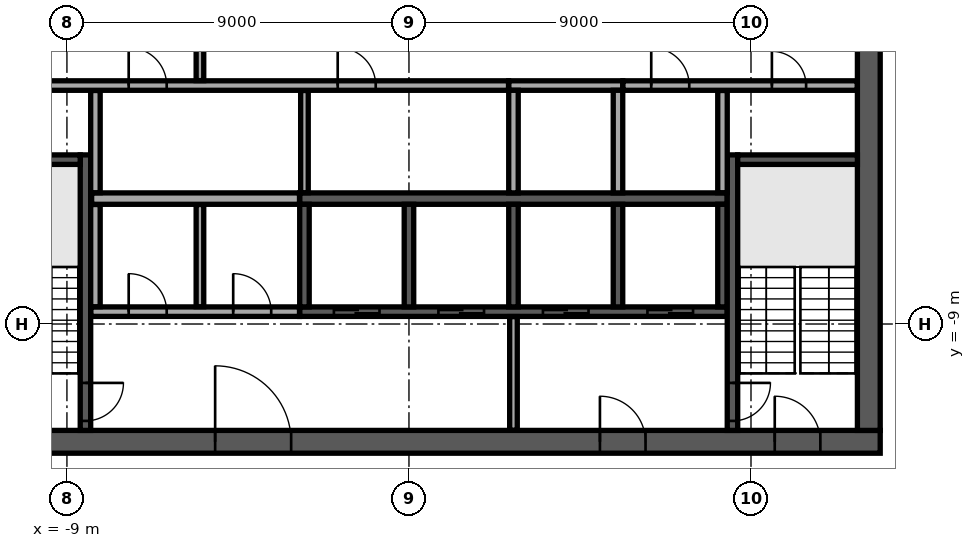
"""IFC4 building model, lengths in metres.
Left out: names, types, materials, properties, quantities, classifications, styles, units other than length and angle.
Written with IfcOpenShell. Run it as: python <this file> out.ifc"""

import sys

from ifc_helpers import new_model, si_unit, direction, frame, frame_2d, origin, place, context, subcontext, project, spatial, rectangle, extrude, element, fill, save


model = new_model("IFC4")
c1 = context("Model", 3, precision=1e-05, world=origin(), true_north=direction((0.0, 1.0)))
c2 = subcontext(c1, "Body", "Model", "MODEL_VIEW")
j1 = project(units=[si_unit("LENGTHUNIT", "METRE"), si_unit("PLANEANGLEUNIT", "RADIAN")], contexts=[c1])
p1 = place(None, origin())
s1 = spatial("IfcSite", under=j1, at=p1, CompositionType="ELEMENT")
p2 = place(p1, origin())
s2 = spatial("IfcBuilding", under=s1, at=p2, CompositionType="ELEMENT")
p3 = place(p2, frame((0.0, 0.0, 296.5)))
s3 = spatial("IfcBuildingStorey", under=s2, at=p3, CompositionType="ELEMENT", Elevation=296.5)
p4 = place(p3, frame((-12.4, -12.1, 0.0), z_axis=(0.0, 0.0, 1.0), x_axis=(1.0, 0.0, 0.0)))
e1 = element("IfcWall", 1, at=p4, inside=s3, PredefinedType="SHEAR", context=c2, shape_type="SweptSolid", body=[
    extrude(rectangle(XDim=24.8, YDim=0.6, at=frame_2d((12.4, 0.0))), origin(), (0.0, 0.0, 1.0), 3.65),
])
p5 = place(p4, frame((7.3, 0.0, 0.0)))
e2 = element("IfcOpeningElement", 2, at=p5, cuts=e1, PredefinedType="OPENING", context=c2, shape_type="SweptSolid", body=[
    extrude(rectangle(XDim=2.0, YDim=2.1, at=frame_2d((1.0, 1.05))), frame((0.0, 0.31, 0.0), z_axis=(0.0, -1.0, 0.0), x_axis=(1.0, 0.0, 0.0)), (0.0, 0.0, 1.0), 0.62),
])
p6 = place(p4, frame((17.425, 0.0, 0.0)))
e3 = element("IfcOpeningElement", 3, at=p6, cuts=e1, PredefinedType="OPENING", context=c2, shape_type="SweptSolid", body=[
    extrude(rectangle(XDim=1.2, YDim=2.1, at=frame_2d((0.6, 1.05))), frame((0.0, 0.31, 0.0), z_axis=(0.0, -1.0, 0.0), x_axis=(1.0, 0.0, 0.0)), (0.0, 0.0, 1.0), 0.62),
])
p7 = place(p4, frame((1.575, 0.0, 0.0)))
e4 = element("IfcOpeningElement", 4, at=p7, cuts=e1, PredefinedType="OPENING", context=c2, shape_type="SweptSolid", body=[
    extrude(rectangle(XDim=1.2, YDim=2.1, at=frame_2d((0.6, 1.05))), frame((0.0, 0.31, 0.0), z_axis=(0.0, -1.0, 0.0), x_axis=(1.0, 0.0, 0.0)), (0.0, 0.0, 1.0), 0.62),
])
p8 = place(p4, frame((22.025, 0.0, 0.0)))
e5 = element("IfcOpeningElement", 5, at=p8, cuts=e1, PredefinedType="OPENING", context=c2, shape_type="SweptSolid", body=[
    extrude(rectangle(XDim=1.2, YDim=2.1, at=frame_2d((0.6, 1.05))), frame((0.0, 0.31, 0.0), z_axis=(0.0, -1.0, 0.0), x_axis=(1.0, 0.0, 0.0)), (0.0, 0.0, 1.0), 0.62),
])
p9 = place(p3, frame((12.1, -11.8, 0.0), z_axis=(0.0, 0.0, 1.0), x_axis=(0.0, 1.0, 0.0)))
e6 = element("IfcWall", 6, at=p9, inside=s3, PredefinedType="SHEAR", context=c2, shape_type="SweptSolid", body=[
    extrude(rectangle(XDim=23.6, YDim=0.6, at=frame_2d((11.8, 0.0))), origin(), (0.0, 0.0, 1.0), 3.65),
])
p10 = place(p9, frame((10.6, 0.0, 0.0)))
e7 = element("IfcOpeningElement", 7, at=p10, cuts=e6, PredefinedType="OPENING", context=c2, shape_type="SweptSolid", body=[
    extrude(rectangle(XDim=2.4, YDim=2.4, at=frame_2d((1.2, 1.2))), frame((0.0, 0.31, 0.0), z_axis=(0.0, -1.0, 0.0), x_axis=(1.0, 0.0, 0.0)), (0.0, 0.0, 1.0), 0.62),
])
p11 = place(p3, frame((-2.875, -5.7, 0.0), z_axis=(0.0, 0.0, 1.0), x_axis=(1.0, 0.0, 0.0)))
e8 = element("IfcWall", 8, at=p11, inside=s3, PredefinedType="SOLIDWALL", context=c2, shape_type="SweptSolid", body=[
    extrude(rectangle(XDim=11.25, YDim=0.3, at=frame_2d((5.625, 0.0))), origin(), (0.0, 0.0, 1.0), 3.65),
])
p12 = place(p3, frame((2.625, -2.725, 0.0), z_axis=(0.0, 0.0, 1.0), x_axis=(1.0, 0.0, 0.0)))
e9 = element("IfcWall", 9, at=p12, inside=s3, PredefinedType="SOLIDWALL", context=c2, shape_type="SweptSolid", body=[
    extrude(rectangle(XDim=3.0, YDim=0.25, at=frame_2d((1.5, 0.0))), origin(), (0.0, 0.0, 1.0), 3.65),
])
for number, where, z_axis, x_axis in (
    (10, (2.75, -5.55, 0.0), (0.0, 0.0, 1.0), (0.0, 1.0, 0.0)),
    (11, (5.5, -5.55, 0.0), (0.0, 0.0, 1.0), (0.0, 1.0, 0.0)),
):
    element("IfcWall", number, at=place(p3, frame(where, z_axis=z_axis, x_axis=x_axis)), inside=s3, PredefinedType="SOLIDWALL", context=c2, shape_type="SweptSolid", body=[
        extrude(rectangle(XDim=2.7, YDim=0.25, at=frame_2d((1.35, 0.0))), origin(), (0.0, 0.0, 1.0), 3.65),
    ])
p13 = place(p3, frame((-2.875, -8.675, 0.0), z_axis=(0.0, 0.0, 1.0), x_axis=(1.0, 0.0, 0.0)))
e12 = element("IfcWall", 12, at=p13, inside=s3, PredefinedType="SOLIDWALL", context=c2, shape_type="SweptSolid", body=[
    extrude(rectangle(XDim=11.25, YDim=0.25, at=frame_2d((5.625, 0.0))), origin(), (0.0, 0.0, 1.0), 3.65),
])
p14 = place(p13, frame((0.9, 0.0, 0.0)))
e13 = element("IfcOpeningElement", 13, at=p14, cuts=e12, PredefinedType="OPENING", context=c2, shape_type="SweptSolid", body=[
    extrude(rectangle(XDim=1.2, YDim=2.1, at=frame_2d((0.6, 1.05))), frame((0.0, 0.135, 0.0), z_axis=(0.0, -1.0, 0.0), x_axis=(1.0, 0.0, 0.0)), (0.0, 0.0, 1.0), 0.27),
])
p15 = place(p13, frame((3.65, 0.0, 0.0)))
e14 = element("IfcOpeningElement", 14, at=p15, cuts=e12, PredefinedType="OPENING", context=c2, shape_type="SweptSolid", body=[
    extrude(rectangle(XDim=1.2, YDim=2.1, at=frame_2d((0.6, 1.05))), frame((0.0, 0.135, 0.0), z_axis=(0.0, -1.0, 0.0), x_axis=(1.0, 0.0, 0.0)), (0.0, 0.0, 1.0), 0.27),
])
p16 = place(p13, frame((6.4, 0.0, 0.0)))
e15 = element("IfcOpeningElement", 15, at=p16, cuts=e12, PredefinedType="OPENING", context=c2, shape_type="SweptSolid", body=[
    extrude(rectangle(XDim=1.2, YDim=2.1, at=frame_2d((0.6, 1.05))), frame((0.0, 0.135, 0.0), z_axis=(0.0, -1.0, 0.0), x_axis=(1.0, 0.0, 0.0)), (0.0, 0.0, 1.0), 0.27),
])
p17 = place(p13, frame((9.15, 0.0, 0.0)))
e16 = element("IfcOpeningElement", 16, at=p17, cuts=e12, PredefinedType="OPENING", context=c2, shape_type="SweptSolid", body=[
    extrude(rectangle(XDim=1.2, YDim=2.1, at=frame_2d((0.6, 1.05))), frame((0.0, 0.135, 0.0), z_axis=(0.0, -1.0, 0.0), x_axis=(1.0, 0.0, 0.0)), (0.0, 0.0, 1.0), 0.27),
])
for number, where, z_axis, x_axis in (
    (17, (-2.75, -8.55, 0.0), (0.0, 0.0, 1.0), (0.0, 1.0, 0.0)),
    (18, (0.0, -8.55, 0.0), (0.0, 0.0, 1.0), (0.0, 1.0, 0.0)),
    (19, (2.75, -8.55, 0.0), (0.0, 0.0, 1.0), (0.0, 1.0, 0.0)),
    (20, (5.5, -8.55, 0.0), (0.0, 0.0, 1.0), (0.0, 1.0, 0.0)),
    (21, (8.25, -8.55, 0.0), (0.0, 0.0, 1.0), (0.0, 1.0, 0.0)),
):
    element("IfcWall", number, at=place(p3, frame(where, z_axis=z_axis, x_axis=x_axis)), inside=s3, PredefinedType="SOLIDWALL", context=c2, shape_type="SweptSolid", body=[
        extrude(rectangle(XDim=2.7, YDim=0.25, at=frame_2d((1.35, 0.0))), origin(), (0.0, 0.0, 1.0), 3.65),
    ])
p18 = place(p3, frame((-8.512, -4.55, 0.0), z_axis=(0.0, 0.0, 1.0), x_axis=(0.0, -1.0, 0.0)))
e22 = element("IfcWall", 22, at=p18, inside=s3, PredefinedType="SOLIDWALL", context=c2, shape_type="SweptSolid", body=[
    extrude(rectangle(XDim=7.25, YDim=0.275, at=frame_2d((3.625, 0.0))), origin(), (0.0, 0.0, 1.0), 3.65),
])
p19 = place(p18, frame((6.0, 0.0, 0.0)))
e23 = element("IfcOpeningElement", 23, at=p19, cuts=e22, PredefinedType="OPENING", context=c2, shape_type="SweptSolid", body=[
    extrude(rectangle(XDim=1.0, YDim=2.1, at=frame_2d((0.5, 1.05))), frame((0.0, 0.147, 0.0), z_axis=(0.0, -1.0, 0.0), x_axis=(1.0, 0.0, 0.0)), (0.0, 0.0, 1.0), 0.295),
])
p20 = place(p3, frame((-8.65, -4.675, 0.0), z_axis=(0.0, 0.0, 1.0), x_axis=(-1.0, 0.0, 0.0)))
e24 = element("IfcWall", 24, at=p20, inside=s3, PredefinedType="SOLIDWALL", context=c2, shape_type="SweptSolid", body=[
    extrude(rectangle(XDim=3.15, YDim=0.25, at=frame_2d((1.575, 0.0))), origin(), (0.0, 0.0, 1.0), 3.65),
])
p21 = place(p3, frame((8.512, -4.55, 0.0), z_axis=(0.0, 0.0, 1.0), x_axis=(0.0, -1.0, 0.0)))
e25 = element("IfcWall", 25, at=p21, inside=s3, PredefinedType="SOLIDWALL", context=c2, shape_type="SweptSolid", body=[
    extrude(rectangle(XDim=7.25, YDim=0.275, at=frame_2d((3.625, 0.0))), origin(), (0.0, 0.0, 1.0), 3.65),
])
p22 = place(p21, frame((6.0, 0.0, 0.0)))
e26 = element("IfcOpeningElement", 26, at=p22, cuts=e25, PredefinedType="OPENING", context=c2, shape_type="SweptSolid", body=[
    extrude(rectangle(XDim=1.0, YDim=2.1, at=frame_2d((0.5, 1.05))), frame((0.0, 0.147, 0.0), z_axis=(0.0, -1.0, 0.0), x_axis=(1.0, 0.0, 0.0)), (0.0, 0.0, 1.0), 0.295),
])
p23 = place(p3, frame((8.65, -4.675, 0.0), z_axis=(0.0, 0.0, 1.0), x_axis=(1.0, 0.0, 0.0)))
e27 = element("IfcWall", 27, at=p23, inside=s3, PredefinedType="SOLIDWALL", context=c2, shape_type="SweptSolid", body=[
    extrude(rectangle(XDim=3.15, YDim=0.25, at=frame_2d((1.575, 0.0))), origin(), (0.0, 0.0, 1.0), 3.65),
])
p24 = place(p3, frame((2.75, -11.795, 0.0), z_axis=(0.0, 0.0, 1.0), x_axis=(0.0, 1.0, 0.0)))
e28 = element("IfcWall", 28, at=p24, inside=s3, PredefinedType="PARTITIONING", context=c2, shape_type="SweptSolid", body=[
    extrude(rectangle(XDim=2.99, YDim=0.2, at=frame_2d((1.495, 0.0))), origin(), (0.0, 0.0, 1.0), 3.65),
])
p25 = place(p3, frame((-8.37, -8.675, 0.0), z_axis=(0.0, 0.0, 1.0), x_axis=(1.0, 0.0, 0.0)))
e29 = element("IfcWall", 29, at=p25, inside=s3, PredefinedType="PARTITIONING", context=c2, shape_type="SweptSolid", body=[
    extrude(rectangle(XDim=5.49, YDim=0.25, at=frame_2d((2.745, 0.0))), origin(), (0.0, 0.0, 1.0), 3.65),
])
p26 = place(p25, frame((0.995, 0.0, 0.0)))
e30 = element("IfcOpeningElement", 30, at=p26, cuts=e29, PredefinedType="OPENING", context=c2, shape_type="SweptSolid", body=[
    extrude(rectangle(XDim=1.0, YDim=2.1, at=frame_2d((0.5, 1.05))), frame((0.0, 0.135, 0.0), z_axis=(0.0, -1.0, 0.0), x_axis=(1.0, 0.0, 0.0)), (0.0, 0.0, 1.0), 0.27),
])
p27 = place(p25, frame((3.745, 0.0, 0.0)))
e31 = element("IfcOpeningElement", 31, at=p27, cuts=e29, PredefinedType="OPENING", context=c2, shape_type="SweptSolid", body=[
    extrude(rectangle(XDim=1.0, YDim=2.1, at=frame_2d((0.5, 1.05))), frame((0.0, 0.135, 0.0), z_axis=(0.0, -1.0, 0.0), x_axis=(1.0, 0.0, 0.0)), (0.0, 0.0, 1.0), 0.27),
])
p28 = place(p3, frame((-8.25, -8.545, 0.0), z_axis=(0.0, 0.0, 1.0), x_axis=(0.0, 1.0, 0.0)))
e32 = element("IfcWall", 32, at=p28, inside=s3, PredefinedType="PARTITIONING", context=c2, shape_type="SweptSolid", body=[
    extrude(rectangle(XDim=2.69, YDim=0.25, at=frame_2d((1.345, 0.0))), origin(), (0.0, 0.0, 1.0), 3.65),
])
p29 = place(p3, frame((-5.5, -8.545, 0.0), z_axis=(0.0, 0.0, 1.0), x_axis=(0.0, 1.0, 0.0)))
e33 = element("IfcWall", 33, at=p29, inside=s3, PredefinedType="PARTITIONING", context=c2, shape_type="SweptSolid", body=[
    extrude(rectangle(XDim=2.69, YDim=0.2, at=frame_2d((1.345, 0.0))), origin(), (0.0, 0.0, 1.0), 3.65),
])
p30 = place(p3, frame((-8.35, -5.7, 0.0), z_axis=(0.0, 0.0, 1.0), x_axis=(1.0, 0.0, 0.0)))
e34 = element("IfcWall", 34, at=p30, inside=s3, PredefinedType="PARTITIONING", context=c2, shape_type="SweptSolid", body=[
    extrude(rectangle(XDim=5.47, YDim=0.3, at=frame_2d((2.735, 0.0))), origin(), (0.0, 0.0, 1.0), 3.65),
])
p31 = place(p3, frame((-8.25, -5.545, 0.0), z_axis=(0.0, 0.0, 1.0), x_axis=(0.0, 1.0, 0.0)))
e35 = element("IfcWall", 35, at=p31, inside=s3, PredefinedType="PARTITIONING", context=c2, shape_type="SweptSolid", body=[
    extrude(rectangle(XDim=2.69, YDim=0.25, at=frame_2d((1.345, 0.0))), origin(), (0.0, 0.0, 1.0), 3.65),
])
p32 = place(p3, frame((-2.75, -5.545, 0.0), z_axis=(0.0, 0.0, 1.0), x_axis=(0.0, 1.0, 0.0)))
e36 = element("IfcWall", 36, at=p32, inside=s3, PredefinedType="PARTITIONING", context=c2, shape_type="SweptSolid", body=[
    extrude(rectangle(XDim=2.69, YDim=0.2, at=frame_2d((1.345, 0.0))), origin(), (0.0, 0.0, 1.0), 3.65),
])
p33 = place(p3, frame((8.25, -5.545, 0.0), z_axis=(0.0, 0.0, 1.0), x_axis=(0.0, 1.0, 0.0)))
e37 = element("IfcWall", 37, at=p33, inside=s3, PredefinedType="PARTITIONING", context=c2, shape_type="SweptSolid", body=[
    extrude(rectangle(XDim=2.69, YDim=0.25, at=frame_2d((1.345, 0.0))), origin(), (0.0, 0.0, 1.0), 3.65),
])
p34 = place(p3, frame((-11.795, -2.725, 0.0), z_axis=(0.0, 0.0, 1.0), x_axis=(1.0, 0.0, 0.0)))
e38 = element("IfcWall", 38, at=p34, inside=s3, PredefinedType="PARTITIONING", context=c2, shape_type="SweptSolid", body=[
    extrude(rectangle(XDim=14.415, YDim=0.25, at=frame_2d((7.208, 0.0))), origin(), (0.0, 0.0, 1.0), 3.65),
])
p35 = place(p34, frame((1.295, 0.0, 0.0)))
e39 = element("IfcOpeningElement", 39, at=p35, cuts=e38, PredefinedType="OPENING", context=c2, shape_type="SweptSolid", body=[
    extrude(rectangle(XDim=1.0, YDim=2.1, at=frame_2d((0.5, 1.05))), frame((0.0, 0.135, 0.0), z_axis=(0.0, -1.0, 0.0), x_axis=(1.0, 0.0, 0.0)), (0.0, 0.0, 1.0), 0.27),
])
p36 = place(p34, frame((4.42, 0.0, 0.0)))
e40 = element("IfcOpeningElement", 40, at=p36, cuts=e38, PredefinedType="OPENING", context=c2, shape_type="SweptSolid", body=[
    extrude(rectangle(XDim=1.0, YDim=2.1, at=frame_2d((0.5, 1.05))), frame((0.0, 0.135, 0.0), z_axis=(0.0, -1.0, 0.0), x_axis=(1.0, 0.0, 0.0)), (0.0, 0.0, 1.0), 0.27),
])
p37 = place(p34, frame((9.92, 0.0, 0.0)))
e41 = element("IfcOpeningElement", 41, at=p37, cuts=e38, PredefinedType="OPENING", context=c2, shape_type="SweptSolid", body=[
    extrude(rectangle(XDim=1.0, YDim=2.1, at=frame_2d((0.5, 1.05))), frame((0.0, 0.135, 0.0), z_axis=(0.0, -1.0, 0.0), x_axis=(1.0, 0.0, 0.0)), (0.0, 0.0, 1.0), 0.27),
])
p38 = place(p3, frame((5.63, -2.725, 0.0), z_axis=(0.0, 0.0, 1.0), x_axis=(1.0, 0.0, 0.0)))
e42 = element("IfcWall", 42, at=p38, inside=s3, PredefinedType="PARTITIONING", context=c2, shape_type="SweptSolid", body=[
    extrude(rectangle(XDim=6.165, YDim=0.25, at=frame_2d((3.083, 0.0))), origin(), (0.0, 0.0, 1.0), 3.65),
])
p39 = place(p38, frame((0.745, 0.0, 0.0)))
e43 = element("IfcOpeningElement", 43, at=p39, cuts=e42, PredefinedType="OPENING", context=c2, shape_type="SweptSolid", body=[
    extrude(rectangle(XDim=1.0, YDim=2.1, at=frame_2d((0.5, 1.05))), frame((0.0, 0.135, 0.0), z_axis=(0.0, -1.0, 0.0), x_axis=(1.0, 0.0, 0.0)), (0.0, 0.0, 1.0), 0.27),
])
p40 = place(p38, frame((3.92, 0.0, 0.0)))
e44 = element("IfcOpeningElement", 44, at=p40, cuts=e42, PredefinedType="OPENING", context=c2, shape_type="SweptSolid", body=[
    extrude(rectangle(XDim=0.9, YDim=2.1, at=frame_2d((0.45, 1.05))), frame((0.0, 0.135, 0.0), z_axis=(0.0, -1.0, 0.0), x_axis=(1.0, 0.0, 0.0)), (0.0, 0.0, 1.0), 0.27),
])
p41 = place(p3, frame((-5.5, -2.595, 0.0), z_axis=(0.0, 0.0, 1.0), x_axis=(0.0, 1.0, 0.0)))
e45 = element("IfcWall", 45, at=p41, inside=s3, PredefinedType="PARTITIONING", context=c2, shape_type="SweptSolid", body=[
    extrude(rectangle(XDim=5.19, YDim=0.2, at=frame_2d((2.595, 0.0))), origin(), (0.0, 0.0, 1.0), 3.65),
])
p42 = place(p41, frame((1.395, 0.0, 0.0)))
e46 = element("IfcOpeningElement", 46, at=p42, cuts=e45, PredefinedType="OPENING", context=c2, shape_type="SweptSolid", body=[
    extrude(rectangle(XDim=2.4, YDim=2.4, at=frame_2d((1.2, 1.2))), frame((0.0, 0.11, 0.0), z_axis=(0.0, -1.0, 0.0), x_axis=(1.0, 0.0, 0.0)), (0.0, 0.0, 1.0), 0.22),
])
p43 = place(p3, frame((-23.896, -11.711, 0.0), z_axis=(0.0, 0.0, 1.0), x_axis=(0.920507643781, -0.390724554821, 0.0)))
e47 = element("IfcWall", 47, at=p43, inside=s3, PredefinedType="PARTITIONING", context=c2, shape_type="SweptSolid", body=[
    extrude(rectangle(XDim=34.917, YDim=0.15, at=frame_2d((17.458, 0.0))), origin(), (0.0, 0.0, 1.0), 3.25),
])
p44 = place(p43, frame((7.05, 0.0, 0.0)))
e48 = element("IfcOpeningElement", 48, at=p44, cuts=e47, PredefinedType="OPENING", context=c2, shape_type="SweptSolid", body=[
    extrude(rectangle(XDim=1.8, YDim=2.1, at=frame_2d((0.9, 1.05))), frame((0.0, 0.085, 0.0), z_axis=(0.0, -1.0, 0.0), x_axis=(1.0, 0.0, 0.0)), (0.0, 0.0, 1.0), 0.17),
])
p45 = place(p43, frame((14.27, 0.0, 0.0)))
e49 = element("IfcOpeningElement", 49, at=p45, cuts=e47, PredefinedType="OPENING", context=c2, shape_type="SweptSolid", body=[
    extrude(rectangle(XDim=1.0, YDim=2.1, at=frame_2d((0.5, 1.05))), frame((0.0, 0.085, 0.0), z_axis=(0.0, -1.0, 0.0), x_axis=(1.0, 0.0, 0.0)), (0.0, 0.0, 1.0), 0.17),
])
p46 = place(p43, frame((29.011, 0.0, 0.0)))
e50 = element("IfcOpeningElement", 50, at=p46, cuts=e47, PredefinedType="OPENING", context=c2, shape_type="SweptSolid", body=[
    extrude(rectangle(XDim=1.0, YDim=2.1, at=frame_2d((0.5, 1.05))), frame((0.0, 0.085, 0.0), z_axis=(0.0, -1.0, 0.0), x_axis=(1.0, 0.0, 0.0)), (0.0, 0.0, 1.0), 0.17),
])
p47 = place(p5, origin())
e51 = element("IfcDoor", 51, at=p47, inside=s3, OperationType="SINGLE_SWING_LEFT", PredefinedType="DOOR", context=c2, shape_type="SweptSolid", body=[
    extrude(rectangle(XDim=2.0, YDim=2.1, at=frame_2d((1.0, 1.05))), frame((0.0, 0.025, 0.0), z_axis=(0.0, -1.0, 0.0), x_axis=(1.0, 0.0, 0.0)), (0.0, 0.0, 1.0), 0.05),
])
fill(e2, e51)
p48 = place(p6, origin())
e52 = element("IfcDoor", 52, at=p48, inside=s3, OperationType="SINGLE_SWING_LEFT", PredefinedType="DOOR", context=c2, shape_type="SweptSolid", body=[
    extrude(rectangle(XDim=1.2, YDim=2.1, at=frame_2d((0.6, 1.05))), frame((0.0, 0.025, 0.0), z_axis=(0.0, -1.0, 0.0), x_axis=(1.0, 0.0, 0.0)), (0.0, 0.0, 1.0), 0.05),
])
fill(e3, e52)
p49 = place(p8, origin())
e53 = element("IfcDoor", 53, at=p49, inside=s3, OperationType="SINGLE_SWING_LEFT", PredefinedType="DOOR", context=c2, shape_type="SweptSolid", body=[
    extrude(rectangle(XDim=1.2, YDim=2.1, at=frame_2d((0.6, 1.05))), frame((0.0, 0.025, 0.0), z_axis=(0.0, -1.0, 0.0), x_axis=(1.0, 0.0, 0.0)), (0.0, 0.0, 1.0), 0.05),
])
fill(e5, e53)
p50 = place(p14, origin())
e54 = element("IfcDoor", 54, at=p50, inside=s3, OperationType="DOUBLE_DOOR_SLIDING", PredefinedType="DOOR", context=c2, shape_type="SweptSolid", body=[
    extrude(rectangle(XDim=1.2, YDim=2.1, at=frame_2d((0.6, 1.05))), frame((0.0, 0.025, 0.0), z_axis=(0.0, -1.0, 0.0), x_axis=(1.0, 0.0, 0.0)), (0.0, 0.0, 1.0), 0.05),
])
fill(e13, e54)
p51 = place(p15, origin())
e55 = element("IfcDoor", 55, at=p51, inside=s3, OperationType="DOUBLE_DOOR_SLIDING", PredefinedType="DOOR", context=c2, shape_type="SweptSolid", body=[
    extrude(rectangle(XDim=1.2, YDim=2.1, at=frame_2d((0.6, 1.05))), frame((0.0, 0.025, 0.0), z_axis=(0.0, -1.0, 0.0), x_axis=(1.0, 0.0, 0.0)), (0.0, 0.0, 1.0), 0.05),
])
fill(e14, e55)
p52 = place(p16, origin())
e56 = element("IfcDoor", 56, at=p52, inside=s3, OperationType="DOUBLE_DOOR_SLIDING", PredefinedType="DOOR", context=c2, shape_type="SweptSolid", body=[
    extrude(rectangle(XDim=1.2, YDim=2.1, at=frame_2d((0.6, 1.05))), frame((0.0, 0.025, 0.0), z_axis=(0.0, -1.0, 0.0), x_axis=(1.0, 0.0, 0.0)), (0.0, 0.0, 1.0), 0.05),
])
fill(e15, e56)
p53 = place(p17, origin())
e57 = element("IfcDoor", 57, at=p53, inside=s3, OperationType="DOUBLE_DOOR_SLIDING", PredefinedType="DOOR", context=c2, shape_type="SweptSolid", body=[
    extrude(rectangle(XDim=1.2, YDim=2.1, at=frame_2d((0.6, 1.05))), frame((0.0, 0.025, 0.0), z_axis=(0.0, -1.0, 0.0), x_axis=(1.0, 0.0, 0.0)), (0.0, 0.0, 1.0), 0.05),
])
fill(e16, e57)
p54 = place(p19, origin())
e58 = element("IfcDoor", 58, at=p54, inside=s3, OperationType="SINGLE_SWING_LEFT", PredefinedType="DOOR", context=c2, shape_type="SweptSolid", body=[
    extrude(rectangle(XDim=1.0, YDim=2.1, at=frame_2d((0.5, 1.05))), frame((0.0, 0.025, 0.0), z_axis=(0.0, -1.0, 0.0), x_axis=(1.0, 0.0, 0.0)), (0.0, 0.0, 1.0), 0.05),
])
fill(e23, e58)
p55 = place(p22, origin())
e59 = element("IfcDoor", 59, at=p55, inside=s3, OperationType="SINGLE_SWING_LEFT", PredefinedType="DOOR", context=c2, shape_type="SweptSolid", body=[
    extrude(rectangle(XDim=1.0, YDim=2.1, at=frame_2d((0.5, 1.05))), frame((0.0, 0.025, 0.0), z_axis=(0.0, -1.0, 0.0), x_axis=(1.0, 0.0, 0.0)), (0.0, 0.0, 1.0), 0.05),
])
fill(e26, e59)
p56 = place(p26, origin())
e60 = element("IfcDoor", 60, at=p56, inside=s3, OperationType="SINGLE_SWING_LEFT", PredefinedType="DOOR", context=c2, shape_type="SweptSolid", body=[
    extrude(rectangle(XDim=1.0, YDim=2.1, at=frame_2d((0.5, 1.05))), frame((0.0, 0.025, 0.0), z_axis=(0.0, -1.0, 0.0), x_axis=(1.0, 0.0, 0.0)), (0.0, 0.0, 1.0), 0.05),
])
fill(e30, e60)
p57 = place(p27, origin())
e61 = element("IfcDoor", 61, at=p57, inside=s3, OperationType="SINGLE_SWING_LEFT", PredefinedType="DOOR", context=c2, shape_type="SweptSolid", body=[
    extrude(rectangle(XDim=1.0, YDim=2.1, at=frame_2d((0.5, 1.05))), frame((0.0, 0.025, 0.0), z_axis=(0.0, -1.0, 0.0), x_axis=(1.0, 0.0, 0.0)), (0.0, 0.0, 1.0), 0.05),
])
fill(e31, e61)
p58 = place(p39, origin())
e62 = element("IfcDoor", 62, at=p58, inside=s3, OperationType="SINGLE_SWING_LEFT", PredefinedType="DOOR", context=c2, shape_type="SweptSolid", body=[
    extrude(rectangle(XDim=1.0, YDim=2.1, at=frame_2d((0.5, 1.05))), frame((0.0, 0.025, 0.0), z_axis=(0.0, -1.0, 0.0), x_axis=(1.0, 0.0, 0.0)), (0.0, 0.0, 1.0), 0.05),
])
fill(e43, e62)
p59 = place(p40, origin())
e63 = element("IfcDoor", 63, at=p59, inside=s3, OperationType="SINGLE_SWING_LEFT", PredefinedType="DOOR", context=c2, shape_type="SweptSolid", body=[
    extrude(rectangle(XDim=0.9, YDim=2.1, at=frame_2d((0.45, 1.05))), frame((0.0, 0.025, 0.0), z_axis=(0.0, -1.0, 0.0), x_axis=(1.0, 0.0, 0.0)), (0.0, 0.0, 1.0), 0.05),
])
fill(e44, e63)
p60 = place(p36, origin())
e64 = element("IfcDoor", 64, at=p60, inside=s3, OperationType="SINGLE_SWING_LEFT", PredefinedType="DOOR", context=c2, shape_type="SweptSolid", body=[
    extrude(rectangle(XDim=1.0, YDim=2.1, at=frame_2d((0.5, 1.05))), frame((0.0, 0.025, 0.0), z_axis=(0.0, -1.0, 0.0), x_axis=(1.0, 0.0, 0.0)), (0.0, 0.0, 1.0), 0.05),
])
fill(e40, e64)
p61 = place(p37, origin())
e65 = element("IfcDoor", 65, at=p61, inside=s3, OperationType="SINGLE_SWING_LEFT", PredefinedType="DOOR", context=c2, shape_type="SweptSolid", body=[
    extrude(rectangle(XDim=1.0, YDim=2.1, at=frame_2d((0.5, 1.05))), frame((0.0, 0.025, 0.0), z_axis=(0.0, -1.0, 0.0), x_axis=(1.0, 0.0, 0.0)), (0.0, 0.0, 1.0), 0.05),
])
fill(e41, e65)
save(model, sys.argv[1])
